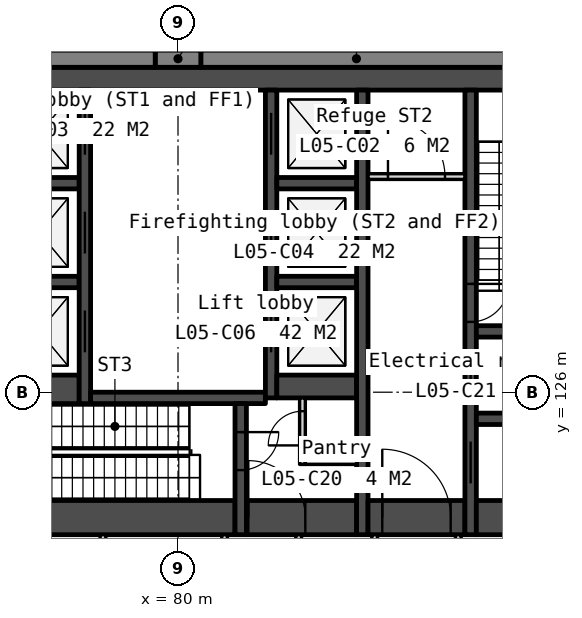
"""IFC4 building model, lengths in metres.
Left out: names, types, materials, properties, quantities, classifications, styles, units other than length and angle.
Written with IfcOpenShell. Run it as: python <this file> out.ifc"""

import sys

from ifc_helpers import new_model, si_unit, direction, frame, frame_2d, origin, place, context, subcontext, project, spatial, rectangle, extrude, element, fill, save


model = new_model("IFC4")
c1 = context("Model", 3, precision=1e-05, world=origin(), true_north=direction((0.0, 1.0)))
c2 = subcontext(c1, "Body", "Model", "MODEL_VIEW")
j1 = project(units=[si_unit("LENGTHUNIT", "METRE"), si_unit("PLANEANGLEUNIT", "RADIAN")], contexts=[c1])
p1 = place(None, origin())
s1 = spatial("IfcSite", under=j1, at=p1, CompositionType="ELEMENT")
p2 = place(p1, origin())
s2 = spatial("IfcBuilding", under=s1, at=p2, CompositionType="ELEMENT")
p3 = place(p2, frame((0.0, 0.0, 30.0)))
s3 = spatial("IfcBuildingStorey", under=s2, at=p3, CompositionType="ELEMENT", Elevation=30.0)
p4 = place(p3, frame((66.0, 134.25, 0.0), z_axis=(0.0, 0.0, 1.0), x_axis=(1.0, 0.0, 0.0)))
e1 = element("IfcWall", 1, at=p4, inside=s3, PredefinedType="SOLIDWALL", context=c2, shape_type="SweptSolid", body=[
    extrude(rectangle(XDim=28.0, YDim=0.6, at=frame_2d((14.0, 0.0))), origin(), (0.0, 0.0, 1.0), 4.8),
])
for number, where, z_axis, x_axis in (
    (2, (75.3, 131.5, 0.0), (0.0, 0.0, 1.0), (1.0, 0.0, 0.0)),
    (3, (75.3, 128.9, 0.0), (0.0, 0.0, 1.0), (1.0, 0.0, 0.0)),
):
    element("IfcWall", number, at=place(p3, frame(where, z_axis=z_axis, x_axis=x_axis)), inside=s3, PredefinedType="SOLIDWALL", context=c2, shape_type="SweptSolid", body=[
        extrude(rectangle(XDim=2.1, YDim=0.3, at=frame_2d((1.05, 0.0))), origin(), (0.0, 0.0, 1.0), 4.8),
    ])
p5 = place(p3, frame((75.3, 126.075, 0.0), z_axis=(0.0, 0.0, 1.0), x_axis=(1.0, 0.0, 0.0)))
e4 = element("IfcWall", 4, at=p5, inside=s3, PredefinedType="SOLIDWALL", context=c2, shape_type="SweptSolid", body=[
    extrude(rectangle(XDim=2.1, YDim=0.75, at=frame_2d((1.05, 0.0))), origin(), (0.0, 0.0, 1.0), 4.8),
])
p6 = place(p3, frame((75.3, 122.7, 0.0), z_axis=(0.0, 0.0, 1.0), x_axis=(1.0, 0.0, 0.0)))
e5 = element("IfcWall", 5, at=p6, inside=s3, PredefinedType="SOLIDWALL", context=c2, shape_type="SweptSolid", body=[
    extrude(rectangle(XDim=6.2, YDim=0.9, at=frame_2d((3.1, 0.0))), origin(), (0.0, 0.0, 1.0), 4.8),
])
p7 = place(p3, frame((77.55, 133.95, 0.0), z_axis=(0.0, 0.0, 1.0), x_axis=(0.0, -1.0, 0.0)))
e6 = element("IfcWall", 6, at=p7, inside=s3, PredefinedType="SOLIDWALL", context=c2, shape_type="SweptSolid", body=[
    extrude(rectangle(XDim=8.25, YDim=0.3, at=frame_2d((4.125, 0.0))), origin(), (0.0, 0.0, 1.0), 4.8),
])
p8 = place(p7, frame((0.6, 0.0, 0.0)))
e7 = element("IfcOpeningElement", 7, at=p8, cuts=e6, PredefinedType="OPENING", context=c2, shape_type="SweptSolid", body=[
    extrude(rectangle(XDim=1.1, YDim=2.1, at=frame_2d((0.55, 1.05))), frame((0.0, 0.16, 0.0), z_axis=(0.0, -1.0, 0.0), x_axis=(1.0, 0.0, 0.0)), (0.0, 0.0, 1.0), 0.32),
])
p9 = place(p7, frame((3.2, 0.0, 0.0)))
e8 = element("IfcOpeningElement", 8, at=p9, cuts=e6, PredefinedType="OPENING", context=c2, shape_type="SweptSolid", body=[
    extrude(rectangle(XDim=1.1, YDim=2.1, at=frame_2d((0.55, 1.05))), frame((0.0, 0.16, 0.0), z_axis=(0.0, -1.0, 0.0), x_axis=(1.0, 0.0, 0.0)), (0.0, 0.0, 1.0), 0.32),
])
p10 = place(p7, frame((5.8, 0.0, 0.0)))
e9 = element("IfcOpeningElement", 9, at=p10, cuts=e6, PredefinedType="OPENING", context=c2, shape_type="SweptSolid", body=[
    extrude(rectangle(XDim=1.1, YDim=2.1, at=frame_2d((0.55, 1.05))), frame((0.0, 0.16, 0.0), z_axis=(0.0, -1.0, 0.0), x_axis=(1.0, 0.0, 0.0)), (0.0, 0.0, 1.0), 0.32),
])
p11 = place(p3, frame((77.7, 125.85, 0.0), z_axis=(0.0, 0.0, 1.0), x_axis=(1.0, 0.0, 0.0)))
e10 = element("IfcWall", 10, at=p11, inside=s3, PredefinedType="SOLIDWALL", context=c2, shape_type="SweptSolid", body=[
    extrude(rectangle(XDim=4.6, YDim=0.3, at=frame_2d((2.3, 0.0))), origin(), (0.0, 0.0, 1.0), 4.8),
])
for number, where, z_axis, x_axis in (
    (11, (78.025, 122.25, 0.0), (0.0, 0.0, 1.0), (0.0, -1.0, 0.0)),
    (12, (81.225, 122.25, 0.0), (0.0, 0.0, 1.0), (0.0, -1.0, 0.0)),
):
    element("IfcWall", number, at=place(p3, frame(where, z_axis=z_axis, x_axis=x_axis)), inside=s3, PredefinedType="PARTITIONING", context=c2, shape_type="SweptSolid", body=[
        extrude(rectangle(XDim=2.1, YDim=0.15, at=frame_2d((1.05, 0.0))), origin(), (0.0, 0.0, 1.0), 4.8),
    ])
p12 = place(p3, frame((81.65, 125.7, 0.0), z_axis=(0.0, 0.0, 1.0), x_axis=(0.0, -1.0, 0.0)))
e13 = element("IfcWall", 13, at=p12, inside=s3, PredefinedType="SOLIDWALL", context=c2, shape_type="SweptSolid", body=[
    extrude(rectangle(XDim=3.45, YDim=0.3, at=frame_2d((1.725, 0.0))), origin(), (0.0, 0.0, 1.0), 4.8),
])
p13 = place(p12, frame((0.75, 0.0, 0.0)))
e14 = element("IfcOpeningElement", 14, at=p13, cuts=e13, PredefinedType="OPENING", context=c2, shape_type="SweptSolid", body=[
    extrude(rectangle(XDim=1.0, YDim=2.1, at=frame_2d((0.5, 1.05))), frame((0.0, 0.16, 0.0), z_axis=(0.0, -1.0, 0.0), x_axis=(1.0, 0.0, 0.0)), (0.0, 0.0, 1.0), 0.32),
])
p14 = place(p3, frame((81.8, 122.7, 0.0), z_axis=(0.0, 0.0, 1.0), x_axis=(1.0, 0.0, 0.0)))
e15 = element("IfcWall", 15, at=p14, inside=s3, PredefinedType="SOLIDWALL", context=c2, shape_type="SweptSolid", body=[
    extrude(rectangle(XDim=2.9, YDim=0.9, at=frame_2d((1.45, 0.0))), origin(), (0.0, 0.0, 1.0), 4.8),
])
p15 = place(p14, frame((0.05, 0.0, 0.0)))
e16 = element("IfcOpeningElement", 16, at=p15, cuts=e15, PredefinedType="OPENING", context=c2, shape_type="SweptSolid", body=[
    extrude(rectangle(XDim=1.5, YDim=2.1, at=frame_2d((0.75, 1.05))), frame((0.0, 0.46, 0.0), z_axis=(0.0, -1.0, 0.0), x_axis=(1.0, 0.0, 0.0)), (0.0, 0.0, 1.0), 0.92),
])
p16 = place(p3, frame((82.45, 133.95, 0.0), z_axis=(0.0, 0.0, 1.0), x_axis=(0.0, -1.0, 0.0)))
e17 = element("IfcWall", 17, at=p16, inside=s3, PredefinedType="SOLIDWALL", context=c2, shape_type="SweptSolid", body=[
    extrude(rectangle(XDim=8.1, YDim=0.3, at=frame_2d((4.05, 0.0))), origin(), (0.0, 0.0, 1.0), 4.8),
])
p17 = place(p16, frame((0.6, 0.0, 0.0)))
e18 = element("IfcOpeningElement", 18, at=p17, cuts=e17, PredefinedType="OPENING", context=c2, shape_type="SweptSolid", body=[
    extrude(rectangle(XDim=1.1, YDim=2.1, at=frame_2d((0.55, 1.05))), frame((0.0, 0.16, 0.0), z_axis=(0.0, -1.0, 0.0), x_axis=(1.0, 0.0, 0.0)), (0.0, 0.0, 1.0), 0.32),
])
p18 = place(p16, frame((3.2, 0.0, 0.0)))
e19 = element("IfcOpeningElement", 19, at=p18, cuts=e17, PredefinedType="OPENING", context=c2, shape_type="SweptSolid", body=[
    extrude(rectangle(XDim=1.1, YDim=2.1, at=frame_2d((0.55, 1.05))), frame((0.0, 0.16, 0.0), z_axis=(0.0, -1.0, 0.0), x_axis=(1.0, 0.0, 0.0)), (0.0, 0.0, 1.0), 0.32),
])
p19 = place(p16, frame((5.8, 0.0, 0.0)))
e20 = element("IfcOpeningElement", 20, at=p19, cuts=e17, PredefinedType="OPENING", context=c2, shape_type="SweptSolid", body=[
    extrude(rectangle(XDim=1.1, YDim=2.1, at=frame_2d((0.55, 1.05))), frame((0.0, 0.16, 0.0), z_axis=(0.0, -1.0, 0.0), x_axis=(1.0, 0.0, 0.0)), (0.0, 0.0, 1.0), 0.32),
])
for number, where, z_axis, x_axis in (
    (21, (82.6, 131.5, 0.0), (0.0, 0.0, 1.0), (1.0, 0.0, 0.0)),
    (22, (82.6, 128.9, 0.0), (0.0, 0.0, 1.0), (1.0, 0.0, 0.0)),
):
    element("IfcWall", number, at=place(p3, frame(where, z_axis=z_axis, x_axis=x_axis)), inside=s3, PredefinedType="SOLIDWALL", context=c2, shape_type="SweptSolid", body=[
        extrude(rectangle(XDim=2.1, YDim=0.3, at=frame_2d((1.05, 0.0))), origin(), (0.0, 0.0, 1.0), 4.8),
    ])
p20 = place(p3, frame((82.6, 126.15, 0.0), z_axis=(0.0, 0.0, 1.0), x_axis=(1.0, 0.0, 0.0)))
e23 = element("IfcWall", 23, at=p20, inside=s3, PredefinedType="SOLIDWALL", context=c2, shape_type="SweptSolid", body=[
    extrude(rectangle(XDim=2.1, YDim=0.6, at=frame_2d((1.05, 0.0))), origin(), (0.0, 0.0, 1.0), 4.8),
])
p21 = place(p3, frame((83.175, 122.25, 0.0), z_axis=(0.0, 0.0, 1.0), x_axis=(0.0, -1.0, 0.0)))
e24 = element("IfcWall", 24, at=p21, inside=s3, PredefinedType="PARTITIONING", context=c2, shape_type="SweptSolid", body=[
    extrude(rectangle(XDim=2.1, YDim=0.15, at=frame_2d((1.05, 0.0))), origin(), (0.0, 0.0, 1.0), 4.8),
])
p22 = place(p3, frame((83.275, 125.85, 0.0), z_axis=(0.0, 0.0, 1.0), x_axis=(0.0, -1.0, 0.0)))
e25 = element("IfcWall", 25, at=p22, inside=s3, PredefinedType="PARTITIONING", context=c2, shape_type="SweptSolid", body=[
    extrude(rectangle(XDim=1.75, YDim=0.15, at=frame_2d((0.875, 0.0))), origin(), (0.0, 0.0, 1.0), 4.8),
])
p23 = place(p22, frame((0.35, 0.0, 0.0)))
e26 = element("IfcOpeningElement", 26, at=p23, cuts=e25, PredefinedType="OPENING", context=c2, shape_type="SweptSolid", body=[
    extrude(rectangle(XDim=0.9, YDim=2.1, at=frame_2d((0.45, 1.05))), frame((0.0, 0.085, 0.0), z_axis=(0.0, -1.0, 0.0), x_axis=(1.0, 0.0, 0.0)), (0.0, 0.0, 1.0), 0.17),
])
p24 = place(p3, frame((83.35, 124.175, 0.0), z_axis=(0.0, 0.0, 1.0), x_axis=(1.0, 0.0, 0.0)))
e27 = element("IfcWall", 27, at=p24, inside=s3, PredefinedType="PARTITIONING", context=c2, shape_type="SweptSolid", body=[
    extrude(rectangle(XDim=1.35, YDim=0.15, at=frame_2d((0.675, 0.0))), origin(), (0.0, 0.0, 1.0), 4.8),
])
p25 = place(p3, frame((84.85, 133.95, 0.0), z_axis=(0.0, 0.0, 1.0), x_axis=(0.0, -1.0, 0.0)))
e28 = element("IfcWall", 28, at=p25, inside=s3, PredefinedType="SOLIDWALL", context=c2, shape_type="SweptSolid", body=[
    extrude(rectangle(XDim=11.7, YDim=0.3, at=frame_2d((5.85, 0.0))), origin(), (0.0, 0.0, 1.0), 4.8),
])
p26 = place(p3, frame((85.0, 131.675, 0.0), z_axis=(0.0, 0.0, 1.0), x_axis=(1.0, 0.0, 0.0)))
e29 = element("IfcWall", 29, at=p26, inside=s3, PredefinedType="PARTITIONING", context=c2, shape_type="SweptSolid", body=[
    extrude(rectangle(XDim=2.55, YDim=0.15, at=frame_2d((1.275, 0.0))), origin(), (0.0, 0.0, 1.0), 4.8),
])
p27 = place(p26, frame((0.525, 0.0, 0.0)))
e30 = element("IfcOpeningElement", 30, at=p27, cuts=e29, PredefinedType="OPENING", context=c2, shape_type="SweptSolid", body=[
    extrude(rectangle(XDim=1.5, YDim=2.1, at=frame_2d((0.75, 1.05))), frame((0.0, 0.085, 0.0), z_axis=(0.0, -1.0, 0.0), x_axis=(1.0, 0.0, 0.0)), (0.0, 0.0, 1.0), 0.17),
])
p28 = place(p3, frame((85.0, 122.7, 0.0), z_axis=(0.0, 0.0, 1.0), x_axis=(1.0, 0.0, 0.0)))
e31 = element("IfcWall", 31, at=p28, inside=s3, PredefinedType="SOLIDWALL", context=c2, shape_type="SweptSolid", body=[
    extrude(rectangle(XDim=2.55, YDim=0.9, at=frame_2d((1.275, 0.0))), origin(), (0.0, 0.0, 1.0), 4.8),
])
p29 = place(p28, frame((0.375, 0.0, 0.0)))
e32 = element("IfcOpeningElement", 32, at=p29, cuts=e31, PredefinedType="OPENING", context=c2, shape_type="SweptSolid", body=[
    extrude(rectangle(XDim=1.8, YDim=2.1, at=frame_2d((0.9, 1.05))), frame((0.0, 0.46, 0.0), z_axis=(0.0, -1.0, 0.0), x_axis=(1.0, 0.0, 0.0)), (0.0, 0.0, 1.0), 0.92),
])
p30 = place(p3, frame((85.175, 122.25, 0.0), z_axis=(0.0, 0.0, 1.0), x_axis=(0.0, -1.0, 0.0)))
e33 = element("IfcWall", 33, at=p30, inside=s3, PredefinedType="PARTITIONING", context=c2, shape_type="SweptSolid", body=[
    extrude(rectangle(XDim=2.1, YDim=0.15, at=frame_2d((1.05, 0.0))), origin(), (0.0, 0.0, 1.0), 4.8),
])
p31 = place(p30, frame((0.55, 0.0, 0.0)))
e34 = element("IfcOpeningElement", 34, at=p31, cuts=e33, PredefinedType="OPENING", context=c2, shape_type="SweptSolid", body=[
    extrude(rectangle(XDim=1.0, YDim=2.1, at=frame_2d((0.5, 1.05))), frame((0.0, 0.085, 0.0), z_axis=(0.0, -1.0, 0.0), x_axis=(1.0, 0.0, 0.0)), (0.0, 0.0, 1.0), 0.17),
])
p32 = place(p3, frame((87.375, 122.25, 0.0), z_axis=(0.0, 0.0, 1.0), x_axis=(0.0, -1.0, 0.0)))
e35 = element("IfcWall", 35, at=p32, inside=s3, PredefinedType="PARTITIONING", context=c2, shape_type="SweptSolid", body=[
    extrude(rectangle(XDim=2.1, YDim=0.15, at=frame_2d((1.05, 0.0))), origin(), (0.0, 0.0, 1.0), 4.8),
])
p33 = place(p3, frame((87.7, 133.95, 0.0), z_axis=(0.0, 0.0, 1.0), x_axis=(0.0, -1.0, 0.0)))
e36 = element("IfcWall", 36, at=p33, inside=s3, PredefinedType="SOLIDWALL", context=c2, shape_type="SweptSolid", body=[
    extrude(rectangle(XDim=11.7, YDim=0.3, at=frame_2d((5.85, 0.0))), origin(), (0.0, 0.0, 1.0), 4.8),
])
p34 = place(p33, frame((6.95, 0.0, 0.0)))
e37 = element("IfcOpeningElement", 37, at=p34, cuts=e36, PredefinedType="OPENING", context=c2, shape_type="SweptSolid", body=[
    extrude(rectangle(XDim=1.1, YDim=2.1, at=frame_2d((0.55, 1.05))), frame((0.0, 0.16, 0.0), z_axis=(0.0, -1.0, 0.0), x_axis=(1.0, 0.0, 0.0)), (0.0, 0.0, 1.0), 0.32),
])
p35 = place(p33, frame((5.1, 0.0, 0.0)))
e38 = element("IfcOpeningElement", 38, at=p35, cuts=e36, PredefinedType="OPENING", context=c2, shape_type="SweptSolid", body=[
    extrude(rectangle(XDim=1.0, YDim=2.1, at=frame_2d((0.5, 1.05))), frame((0.0, 0.16, 0.0), z_axis=(0.0, -1.0, 0.0), x_axis=(1.0, 0.0, 0.0)), (0.0, 0.0, 1.0), 0.32),
])
p36 = place(p33, frame((9.25, 0.0, 0.0)))
e39 = element("IfcOpeningElement", 39, at=p36, cuts=e36, PredefinedType="OPENING", context=c2, shape_type="SweptSolid", body=[
    extrude(rectangle(XDim=1.1, YDim=2.1, at=frame_2d((0.55, 1.05))), frame((0.0, 0.16, 0.0), z_axis=(0.0, -1.0, 0.0), x_axis=(1.0, 0.0, 0.0)), (0.0, 0.0, 1.0), 0.32),
])
for number, where, z_axis, x_axis in (
    (40, (87.85, 127.6, 0.0), (0.0, 0.0, 1.0), (1.0, 0.0, 0.0)),
    (41, (87.85, 125.3, 0.0), (0.0, 0.0, 1.0), (1.0, 0.0, 0.0)),
):
    element("IfcWall", number, at=place(p3, frame(where, z_axis=z_axis, x_axis=x_axis)), inside=s3, PredefinedType="SOLIDWALL", context=c2, shape_type="SweptSolid", body=[
        extrude(rectangle(XDim=2.55, YDim=0.3, at=frame_2d((1.275, 0.0))), origin(), (0.0, 0.0, 1.0), 4.8),
    ])
p37 = place(p3, frame((87.85, 122.7, 0.0), z_axis=(0.0, 0.0, 1.0), x_axis=(1.0, 0.0, 0.0)))
e42 = element("IfcWall", 42, at=p37, inside=s3, PredefinedType="SOLIDWALL", context=c2, shape_type="SweptSolid", body=[
    extrude(rectangle(XDim=2.55, YDim=0.9, at=frame_2d((1.275, 0.0))), origin(), (0.0, 0.0, 1.0), 4.8),
])
p38 = place(p3, frame((88.791, 134.775, -0.3), z_axis=(0.0, 0.0, 1.0), x_axis=(-1.0, 0.0, 0.0)))
e43 = element("IfcWall", 43, at=p38, inside=s3, PredefinedType="SOLIDWALL", context=c2, shape_type="SweptSolid", body=[
    extrude(rectangle(XDim=8.191, YDim=0.45, at=frame_2d((4.096, 0.0))), origin(), (0.0, 0.0, 1.0), 4.413),
])
p39 = place(p3, frame((80.6, 134.775, -0.3), z_axis=(0.0, 0.0, 1.0), x_axis=(-1.0, 0.0, 0.0)))
e44 = element("IfcWall", 44, at=p39, inside=s3, PredefinedType="SOLIDWALL", context=c2, shape_type="SweptSolid", body=[
    extrude(rectangle(XDim=1.2, YDim=0.45, at=frame_2d((0.6, 0.0))), origin(), (0.0, 0.0, 1.0), 4.413),
])
p40 = place(p3, frame((79.4, 134.775, -0.3), z_axis=(0.0, 0.0, 1.0), x_axis=(-1.0, 0.0, 0.0)))
e45 = element("IfcWall", 45, at=p40, inside=s3, PredefinedType="SOLIDWALL", context=c2, shape_type="SweptSolid", body=[
    extrude(rectangle(XDim=8.191, YDim=0.45, at=frame_2d((4.096, 0.0))), origin(), (0.0, 0.0, 1.0), 4.413),
])
for number, where, z_axis, x_axis in (
    (46, (115.981, 129.091, 0.0), (0.0, 0.0, 1.0), (-0.5, -0.866, 0.0)),
    (47, (77.166, 71.679, 0.0), (0.0, 0.0, 1.0), (-0.5, 0.866, 0.0)),
):
    element("IfcWall", number, at=place(p3, frame(where, z_axis=z_axis, x_axis=x_axis)), inside=s3, PredefinedType="STANDARD", context=c2, shape_type="SweptSolid", body=[
        extrude(rectangle(XDim=66.294, YDim=1.0, at=frame_2d((33.147, 0.0))), origin(), (0.0, 0.0, 1.0), 0.6),
    ])
p41 = place(p8, origin())
e48 = element("IfcDoor", 48, at=p41, inside=s3, OperationType="SLIDING_TO_RIGHT", PredefinedType="DOOR", context=c2, shape_type="SweptSolid", body=[
    extrude(rectangle(XDim=1.1, YDim=2.1, at=frame_2d((0.55, 1.05))), frame((0.0, 0.025, 0.0), z_axis=(0.0, -1.0, 0.0), x_axis=(1.0, 0.0, 0.0)), (0.0, 0.0, 1.0), 0.05),
])
fill(e7, e48)
p42 = place(p9, origin())
e49 = element("IfcDoor", 49, at=p42, inside=s3, OperationType="SLIDING_TO_RIGHT", PredefinedType="DOOR", context=c2, shape_type="SweptSolid", body=[
    extrude(rectangle(XDim=1.1, YDim=2.1, at=frame_2d((0.55, 1.05))), frame((0.0, 0.025, 0.0), z_axis=(0.0, -1.0, 0.0), x_axis=(1.0, 0.0, 0.0)), (0.0, 0.0, 1.0), 0.05),
])
fill(e8, e49)
p43 = place(p10, origin())
e50 = element("IfcDoor", 50, at=p43, inside=s3, OperationType="SLIDING_TO_RIGHT", PredefinedType="DOOR", context=c2, shape_type="SweptSolid", body=[
    extrude(rectangle(XDim=1.1, YDim=2.1, at=frame_2d((0.55, 1.05))), frame((0.0, 0.025, 0.0), z_axis=(0.0, -1.0, 0.0), x_axis=(1.0, 0.0, 0.0)), (0.0, 0.0, 1.0), 0.05),
])
fill(e9, e50)
p44 = place(p17, origin())
e51 = element("IfcDoor", 51, at=p44, inside=s3, OperationType="SLIDING_TO_LEFT", PredefinedType="DOOR", context=c2, shape_type="SweptSolid", body=[
    extrude(rectangle(XDim=1.1, YDim=2.1, at=frame_2d((0.55, 1.05))), frame((0.0, 0.025, 0.0), z_axis=(0.0, -1.0, 0.0), x_axis=(1.0, 0.0, 0.0)), (0.0, 0.0, 1.0), 0.05),
])
fill(e18, e51)
p45 = place(p18, origin())
e52 = element("IfcDoor", 52, at=p45, inside=s3, OperationType="SLIDING_TO_LEFT", PredefinedType="DOOR", context=c2, shape_type="SweptSolid", body=[
    extrude(rectangle(XDim=1.1, YDim=2.1, at=frame_2d((0.55, 1.05))), frame((0.0, 0.025, 0.0), z_axis=(0.0, -1.0, 0.0), x_axis=(1.0, 0.0, 0.0)), (0.0, 0.0, 1.0), 0.05),
])
fill(e19, e52)
p46 = place(p19, origin())
e53 = element("IfcDoor", 53, at=p46, inside=s3, OperationType="SLIDING_TO_LEFT", PredefinedType="DOOR", context=c2, shape_type="SweptSolid", body=[
    extrude(rectangle(XDim=1.1, YDim=2.1, at=frame_2d((0.55, 1.05))), frame((0.0, 0.025, 0.0), z_axis=(0.0, -1.0, 0.0), x_axis=(1.0, 0.0, 0.0)), (0.0, 0.0, 1.0), 0.05),
])
fill(e20, e53)
p47 = place(p34, origin())
e54 = element("IfcDoor", 54, at=p47, inside=s3, OperationType="SLIDING_TO_LEFT", PredefinedType="DOOR", context=c2, shape_type="SweptSolid", body=[
    extrude(rectangle(XDim=1.1, YDim=2.1, at=frame_2d((0.55, 1.05))), frame((0.0, 0.025, 0.0), z_axis=(0.0, -1.0, 0.0), x_axis=(1.0, 0.0, 0.0)), (0.0, 0.0, 1.0), 0.05),
])
fill(e37, e54)
p48 = place(p29, origin())
e55 = element("IfcDoor", 55, at=p48, inside=s3, OperationType="DOUBLE_DOOR_DOUBLE_SWING", PredefinedType="DOOR", context=c2, shape_type="SweptSolid", body=[
    extrude(rectangle(XDim=1.8, YDim=2.1, at=frame_2d((0.9, 1.05))), frame((0.0, 0.025, 0.0), z_axis=(0.0, -1.0, 0.0), x_axis=(1.0, 0.0, 0.0)), (0.0, 0.0, 1.0), 0.05),
])
fill(e32, e55)
p49 = place(p15, origin())
e56 = element("IfcDoor", 56, at=p49, inside=s3, OperationType="DOUBLE_DOOR_DOUBLE_SWING", PredefinedType="DOOR", context=c2, shape_type="SweptSolid", body=[
    extrude(rectangle(XDim=1.5, YDim=2.1, at=frame_2d((0.75, 1.05))), frame((0.0, 0.025, 0.0), z_axis=(0.0, -1.0, 0.0), x_axis=(1.0, 0.0, 0.0)), (0.0, 0.0, 1.0), 0.05),
])
fill(e16, e56)
p50 = place(p23, origin())
e57 = element("IfcDoor", 57, at=p50, inside=s3, OperationType="SINGLE_SWING_RIGHT", PredefinedType="DOOR", context=c2, shape_type="SweptSolid", body=[
    extrude(rectangle(XDim=0.9, YDim=2.1, at=frame_2d((0.45, 1.05))), frame((0.0, 0.025, 0.0), z_axis=(0.0, -1.0, 0.0), x_axis=(1.0, 0.0, 0.0)), (0.0, 0.0, 1.0), 0.05),
])
fill(e26, e57)
p51 = place(p27, origin())
e58 = element("IfcDoor", 58, at=p51, inside=s3, OperationType="DOUBLE_DOOR_DOUBLE_SWING", PredefinedType="DOOR", context=c2, shape_type="SweptSolid", body=[
    extrude(rectangle(XDim=1.5, YDim=2.1, at=frame_2d((0.75, 1.05))), frame((0.0, 0.025, 0.0), z_axis=(0.0, -1.0, 0.0), x_axis=(1.0, 0.0, 0.0)), (0.0, 0.0, 1.0), 0.05),
])
fill(e30, e58)
p52 = place(p35, origin())
e59 = element("IfcDoor", 59, at=p52, inside=s3, OperationType="SINGLE_SWING_LEFT", PredefinedType="DOOR", context=c2, shape_type="SweptSolid", body=[
    extrude(rectangle(XDim=1.0, YDim=2.1, at=frame_2d((0.5, 1.05))), frame((0.0, 0.025, 0.0), z_axis=(0.0, -1.0, 0.0), x_axis=(1.0, 0.0, 0.0)), (0.0, 0.0, 1.0), 0.05),
])
fill(e38, e59)
p53 = place(p13, origin())
e60 = element("IfcDoor", 60, at=p53, inside=s3, OperationType="SINGLE_SWING_LEFT", PredefinedType="DOOR", context=c2, shape_type="SweptSolid", body=[
    extrude(rectangle(XDim=1.0, YDim=2.1, at=frame_2d((0.5, 1.05))), frame((0.0, 0.025, 0.0), z_axis=(0.0, -1.0, 0.0), x_axis=(1.0, 0.0, 0.0)), (0.0, 0.0, 1.0), 0.05),
])
fill(e14, e60)
p54 = place(p36, origin())
e61 = element("IfcDoor", 61, at=p54, inside=s3, OperationType="SLIDING_TO_LEFT", PredefinedType="DOOR", context=c2, shape_type="SweptSolid", body=[
    extrude(rectangle(XDim=1.1, YDim=2.1, at=frame_2d((0.55, 1.05))), frame((0.0, 0.025, 0.0), z_axis=(0.0, -1.0, 0.0), x_axis=(1.0, 0.0, 0.0)), (0.0, 0.0, 1.0), 0.05),
])
fill(e39, e61)
save(model, sys.argv[1])
